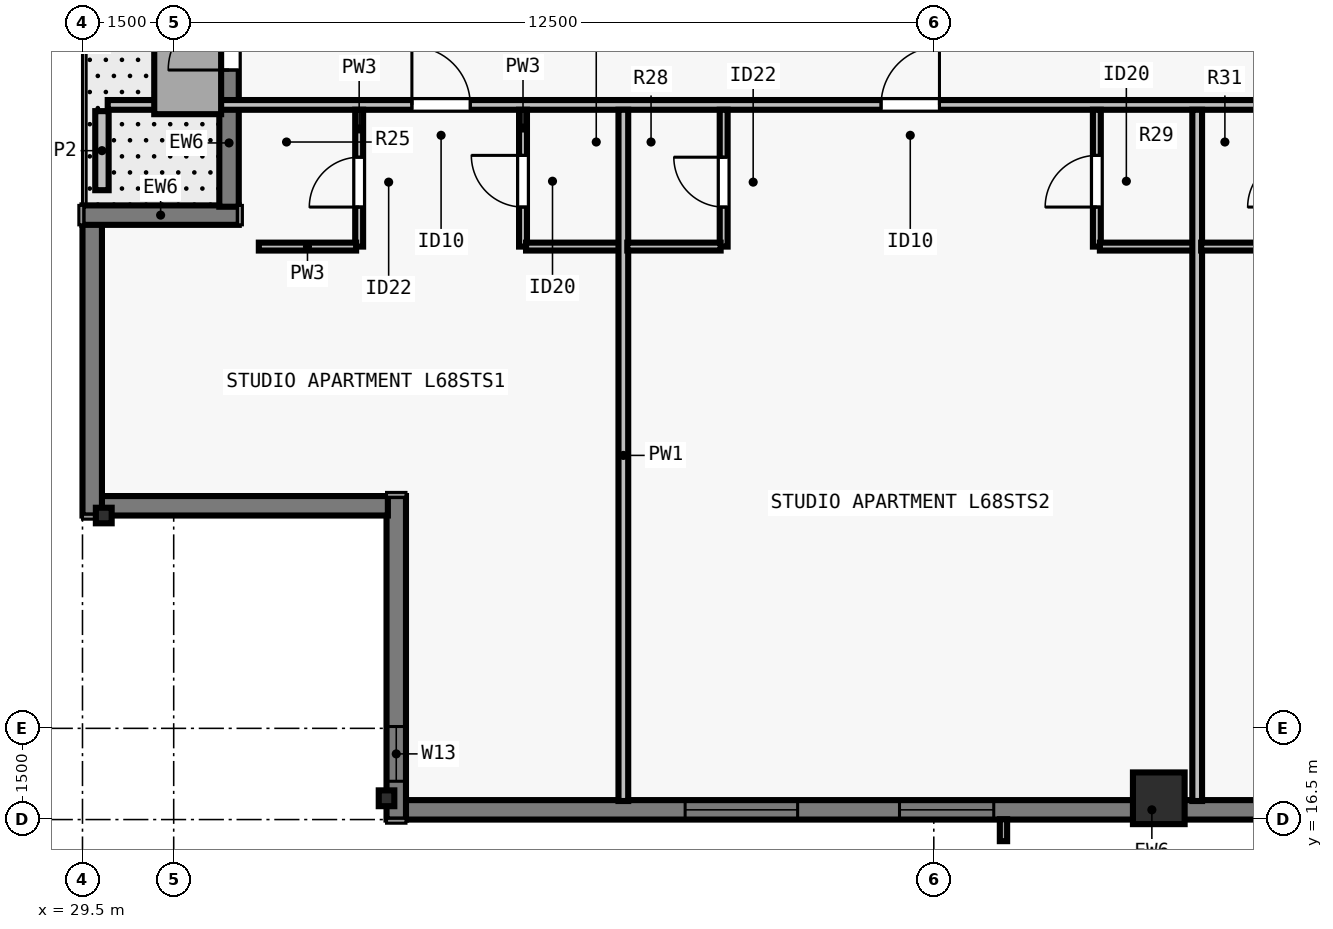
"""IFC4 building model, lengths in metres.
Left out: names, types, materials, properties, quantities, classifications, styles, units other than length and angle.
Written with IfcOpenShell. Run it as: python <this file> out.ifc"""

import sys

from ifc_helpers import new_model, si_unit, direction, frame, frame_2d, origin, origin_2d, place, context, subcontext, project, spatial, rectangle, i_section, extrude, element, fill, save


model = new_model("IFC4")
c1 = context("Model", 3, precision=1e-05, world=origin(), true_north=direction((0.0, 1.0)))
c2 = subcontext(c1, "Body", "Model", "MODEL_VIEW")
j1 = project(units=[si_unit("LENGTHUNIT", "METRE"), si_unit("PLANEANGLEUNIT", "RADIAN")], contexts=[c1])
p1 = place(None, origin())
s1 = spatial("IfcSite", under=j1, at=p1, CompositionType="ELEMENT")
p2 = place(p1, origin())
s2 = spatial("IfcBuilding", under=s1, at=p2, CompositionType="ELEMENT")
p3 = place(p2, frame((0.0, 0.0, 248.0)))
s3 = spatial("IfcBuildingStorey", under=s2, at=p3, CompositionType="ELEMENT", Elevation=248.0)
p4 = place(p3, frame((34.5, 16.85, 0.0), z_axis=(0.0, 0.0, 1.0), x_axis=(1.0, 0.0, 0.0)))
e1 = element("IfcColumn", 1, at=p4, inside=s3, PredefinedType="COLUMN", context=c2, shape_type="SweptSolid", body=[
    extrude(i_section(OverallWidth=0.256, OverallDepth=0.26, WebThickness=0.01, FlangeThickness=0.017, FilletRadius=0.013, at=origin_2d()), origin(), (0.0, 0.0, 1.0), 3.5),
])
p5 = place(p3, frame((47.2, 16.85, 0.0), z_axis=(0.0, 0.0, 1.0), x_axis=(1.0, 0.0, 0.0)))
e2 = element("IfcColumn", 2, at=p5, inside=s3, PredefinedType="COLUMN", context=c2, shape_type="SweptSolid", body=[
    extrude(rectangle(XDim=0.85, YDim=0.85, at=origin_2d()), origin(), (0.0, 0.0, 1.0), 3.5),
])
p6 = place(p3, frame((29.85, 21.5, 0.0), z_axis=(0.0, 0.0, 1.0), x_axis=(0.0, 1.0, 0.0)))
e3 = element("IfcColumn", 3, at=p6, inside=s3, PredefinedType="COLUMN", context=c2, shape_type="SweptSolid", body=[
    extrude(i_section(OverallWidth=0.256, OverallDepth=0.26, WebThickness=0.01, FlangeThickness=0.017, FilletRadius=0.013, at=origin_2d()), origin(), (0.0, 0.0, 1.0), 3.5),
])
p7 = place(p3, frame((69.5, 16.66, 0.0), z_axis=(0.0, 0.0, 1.0), x_axis=(-1.0, 0.0, 0.0)))
e4 = element("IfcWall", 4, at=p7, inside=s3, PredefinedType="SOLIDWALL", context=c2, shape_type="SweptSolid", body=[
    extrude(rectangle(XDim=34.702, YDim=0.32, at=frame_2d((17.351, 0.0))), origin(), (0.0, 0.0, 1.0), 3.29),
])
p8 = place(p7, frame((4.763, 0.0, 0.8)))
e5 = element("IfcOpeningElement", 5, at=p8, cuts=e4, PredefinedType="OPENING", context=c2, shape_type="SweptSolid", body=[
    extrude(rectangle(XDim=1.55, YDim=1.678, at=frame_2d((0.775, 0.839))), frame((0.0, 0.17, 0.0), z_axis=(0.0, -1.0, 0.0), x_axis=(1.0, 0.0, 0.0)), (0.0, 0.0, 1.0), 0.34),
])
p9 = place(p7, frame((7.988, 0.0, 0.8)))
e6 = element("IfcOpeningElement", 6, at=p9, cuts=e4, PredefinedType="OPENING", context=c2, shape_type="SweptSolid", body=[
    extrude(rectangle(XDim=1.85, YDim=1.678, at=frame_2d((0.925, 0.839))), frame((0.0, 0.17, 0.0), z_axis=(0.0, -1.0, 0.0), x_axis=(1.0, 0.0, 0.0)), (0.0, 0.0, 1.0), 0.34),
])
p10 = place(p7, frame((10.263, 0.0, 0.8)))
e7 = element("IfcOpeningElement", 7, at=p10, cuts=e4, PredefinedType="OPENING", context=c2, shape_type="SweptSolid", body=[
    extrude(rectangle(XDim=1.55, YDim=1.678, at=frame_2d((0.775, 0.839))), frame((0.0, 0.17, 0.0), z_axis=(0.0, -1.0, 0.0), x_axis=(1.0, 0.0, 0.0)), (0.0, 0.0, 1.0), 0.34),
])
p11 = place(p7, frame((14.738, 0.0, 0.8)))
e8 = element("IfcOpeningElement", 8, at=p11, cuts=e4, PredefinedType="OPENING", context=c2, shape_type="SweptSolid", body=[
    extrude(rectangle(XDim=1.85, YDim=1.678, at=frame_2d((0.925, 0.839))), frame((0.0, 0.17, 0.0), z_axis=(0.0, -1.0, 0.0), x_axis=(1.0, 0.0, 0.0)), (0.0, 0.0, 1.0), 0.34),
])
p12 = place(p7, frame((18.264, 0.0, 0.8)))
e9 = element("IfcOpeningElement", 9, at=p12, cuts=e4, PredefinedType="OPENING", context=c2, shape_type="SweptSolid", body=[
    extrude(rectangle(XDim=1.55, YDim=1.678, at=frame_2d((0.775, 0.839))), frame((0.0, 0.17, 0.0), z_axis=(0.0, -1.0, 0.0), x_axis=(1.0, 0.0, 0.0)), (0.0, 0.0, 1.0), 0.34),
])
p13 = place(p7, frame((25.014, 0.0, 0.8)))
e10 = element("IfcOpeningElement", 10, at=p13, cuts=e4, PredefinedType="OPENING", context=c2, shape_type="SweptSolid", body=[
    extrude(rectangle(XDim=1.55, YDim=1.678, at=frame_2d((0.775, 0.839))), frame((0.0, 0.17, 0.0), z_axis=(0.0, -1.0, 0.0), x_axis=(1.0, 0.0, 0.0)), (0.0, 0.0, 1.0), 0.34),
])
p14 = place(p7, frame((28.24, 0.0, 0.8)))
e11 = element("IfcOpeningElement", 11, at=p14, cuts=e4, PredefinedType="OPENING", context=c2, shape_type="SweptSolid", body=[
    extrude(rectangle(XDim=1.85, YDim=1.678, at=frame_2d((0.925, 0.839))), frame((0.0, 0.17, 0.0), z_axis=(0.0, -1.0, 0.0), x_axis=(1.0, 0.0, 0.0)), (0.0, 0.0, 1.0), 0.34),
])
p15 = place(p3, frame((34.66, 16.5, 0.0), z_axis=(0.0, 0.0, 1.0), x_axis=(0.0, 1.0, 0.0)))
e12 = element("IfcWall", 12, at=p15, inside=s3, PredefinedType="SOLIDWALL", context=c2, shape_type="SweptSolid", body=[
    extrude(rectangle(XDim=5.32, YDim=0.32, at=frame_2d((2.66, 0.0))), origin(), (0.0, 0.0, 1.0), 3.29),
])
p16 = place(p15, frame((0.63, 0.0, 0.8)))
e13 = element("IfcOpeningElement", 13, at=p16, cuts=e12, PredefinedType="OPENING", context=c2, shape_type="SweptSolid", body=[
    extrude(rectangle(XDim=0.9, YDim=1.678, at=frame_2d((0.45, 0.839))), frame((0.0, 0.17, 0.0), z_axis=(0.0, -1.0, 0.0), x_axis=(1.0, 0.0, 0.0)), (0.0, 0.0, 1.0), 0.34),
])
p17 = place(p3, frame((34.522, 21.66, 0.0), z_axis=(0.0, 0.0, 1.0), x_axis=(-1.0, 0.0, 0.0)))
e14 = element("IfcWall", 14, at=p17, inside=s3, PredefinedType="SOLIDWALL", context=c2, shape_type="SweptSolid", body=[
    extrude(rectangle(XDim=4.724, YDim=0.32, at=frame_2d((2.362, 0.0))), origin(), (0.0, 0.0, 1.0), 3.29),
])
p18 = place(p3, frame((29.66, 21.5, 0.0), z_axis=(0.0, 0.0, 1.0), x_axis=(0.0, 1.0, 0.0)))
e15 = element("IfcWall", 15, at=p18, inside=s3, PredefinedType="SOLIDWALL", context=c2, shape_type="SweptSolid", body=[
    extrude(rectangle(XDim=4.802, YDim=0.32, at=frame_2d((2.401, 0.0))), origin(), (0.0, 0.0, 1.0), 3.29),
])
p19 = place(p3, frame((29.5, 26.44, 0.0), z_axis=(0.0, 0.0, 1.0), x_axis=(1.0, 0.0, 0.0)))
e16 = element("IfcWall", 16, at=p19, inside=s3, PredefinedType="SOLIDWALL", context=c2, shape_type="SweptSolid", body=[
    extrude(rectangle(XDim=2.57, YDim=0.32, at=frame_2d((1.285, 0.0))), origin(), (0.0, 0.0, 1.0), 3.29),
])
p20 = place(p3, frame((31.91, 26.578, 0.0), z_axis=(0.0, 0.0, 1.0), x_axis=(0.0, 1.0, 0.0)))
e17 = element("IfcWall", 17, at=p20, inside=s3, PredefinedType="SOLIDWALL", context=c2, shape_type="SweptSolid", body=[
    extrude(rectangle(XDim=5.742, YDim=0.32, at=frame_2d((2.871, 0.0))), origin(), (0.0, 0.0, 1.0), 3.29),
])
p21 = place(p20, frame((2.248, 0.0, 0.0)))
e18 = element("IfcOpeningElement", 18, at=p21, cuts=e17, PredefinedType="OPENING", context=c2, shape_type="SweptSolid", body=[
    extrude(rectangle(XDim=1.0, YDim=2.15, at=frame_2d((0.5, 1.075))), frame((0.0, 0.17, 0.0), z_axis=(0.0, -1.0, 0.0), x_axis=(1.0, 0.0, 0.0)), (0.0, 0.0, 1.0), 0.34),
])
p22 = place(p20, frame((4.23, 0.0, 0.8)))
e19 = element("IfcOpeningElement", 19, at=p22, cuts=e17, PredefinedType="OPENING", context=c2, shape_type="SweptSolid", body=[
    extrude(rectangle(XDim=0.9, YDim=1.678, at=frame_2d((0.45, 0.839))), frame((0.0, 0.17, 0.0), z_axis=(0.0, -1.0, 0.0), x_axis=(1.0, 0.0, 0.0)), (0.0, 0.0, 1.0), 0.34),
])
p23 = place(p3, frame((29.82, 26.85, 0.0), z_axis=(0.0, 0.0, 1.0), x_axis=(0.0, 1.0, 0.0)))
e20 = element("IfcWall", 20, at=p23, inside=s3, PredefinedType="PARAPET", context=c2, shape_type="SweptSolid", body=[
    extrude(rectangle(XDim=1.3, YDim=0.22, at=frame_2d((0.65, 0.0))), origin(), (0.0, 0.0, 1.0), 0.55),
])
p24 = place(p3, frame((29.915, 28.252, 0.0), z_axis=(0.0, 0.0, 1.0), x_axis=(1.0, 0.0, 0.0)))
e21 = element("IfcWall", 21, at=p24, inside=s3, PredefinedType="PARTITIONING", context=c2, shape_type="SweptSolid", body=[
    extrude(rectangle(XDim=44.28, YDim=0.16, at=frame_2d((22.14, 0.0))), origin(), (0.0, 0.0, 1.0), 2.958),
])
p25 = place(p24, frame((5.002, 0.0, 0.0)))
e22 = element("IfcOpeningElement", 22, at=p25, cuts=e21, PredefinedType="OPENING", context=c2, shape_type="SweptSolid", body=[
    extrude(rectangle(XDim=0.96, YDim=2.18, at=frame_2d((0.48, 1.09))), frame((0.0, 0.09, 0.0), z_axis=(0.0, -1.0, 0.0), x_axis=(1.0, 0.0, 0.0)), (0.0, 0.0, 1.0), 0.18),
])
p26 = place(p24, frame((12.718, 0.0, 0.0)))
e23 = element("IfcOpeningElement", 23, at=p26, cuts=e21, PredefinedType="OPENING", context=c2, shape_type="SweptSolid", body=[
    extrude(rectangle(XDim=0.96, YDim=2.18, at=frame_2d((0.48, 1.09))), frame((0.0, 0.09, 0.0), z_axis=(0.0, -1.0, 0.0), x_axis=(1.0, 0.0, 0.0)), (0.0, 0.0, 1.0), 0.18),
])
p27 = place(p24, frame((21.55, 0.0, 0.0)))
e24 = element("IfcOpeningElement", 24, at=p27, cuts=e21, PredefinedType="OPENING", context=c2, shape_type="SweptSolid", body=[
    extrude(rectangle(XDim=0.96, YDim=2.18, at=frame_2d((0.48, 1.09))), frame((0.0, 0.09, 0.0), z_axis=(0.0, -1.0, 0.0), x_axis=(1.0, 0.0, 0.0)), (0.0, 0.0, 1.0), 0.18),
])
p28 = place(p24, frame((30.382, 0.0, 0.0)))
e25 = element("IfcOpeningElement", 25, at=p28, cuts=e21, PredefinedType="OPENING", context=c2, shape_type="SweptSolid", body=[
    extrude(rectangle(XDim=0.96, YDim=2.18, at=frame_2d((0.48, 1.09))), frame((0.0, 0.09, 0.0), z_axis=(0.0, -1.0, 0.0), x_axis=(1.0, 0.0, 0.0)), (0.0, 0.0, 1.0), 0.18),
])
p29 = place(p24, frame((39.393, 0.0, 0.0)))
e26 = element("IfcOpeningElement", 26, at=p29, cuts=e21, PredefinedType="OPENING", context=c2, shape_type="SweptSolid", body=[
    extrude(rectangle(XDim=0.96, YDim=2.18, at=frame_2d((0.48, 1.09))), frame((0.0, 0.09, 0.0), z_axis=(0.0, -1.0, 0.0), x_axis=(1.0, 0.0, 0.0)), (0.0, 0.0, 1.0), 0.18),
])
p30 = place(p3, frame((34.05, 25.923, 0.0), z_axis=(0.0, 0.0, 1.0), x_axis=(0.0, 1.0, 0.0)))
e27 = element("IfcWall", 27, at=p30, inside=s3, PredefinedType="PLUMBINGWALL", context=c2, shape_type="SweptSolid", body=[
    extrude(rectangle(XDim=2.25, YDim=0.13, at=frame_2d((1.125, 0.0))), origin(), (0.0, 0.0, 1.0), 3.29),
])
p31 = place(p30, frame((0.65, 0.0, 0.0)))
e28 = element("IfcOpeningElement", 28, at=p31, cuts=e27, PredefinedType="OPENING", context=c2, shape_type="SweptSolid", body=[
    extrude(rectangle(XDim=0.82, YDim=2.1, at=frame_2d((0.41, 1.05))), frame((0.0, 0.075, 0.0), z_axis=(0.0, -1.0, 0.0), x_axis=(1.0, 0.0, 0.0)), (0.0, 0.0, 1.0), 0.15),
])
p32 = place(p3, frame((32.4, 25.923, 0.0), z_axis=(0.0, 0.0, 1.0), x_axis=(1.0, 0.0, 0.0)))
e29 = element("IfcWall", 29, at=p32, inside=s3, PredefinedType="PLUMBINGWALL", context=c2, shape_type="SweptSolid", body=[
    extrude(rectangle(XDim=1.6, YDim=0.13, at=frame_2d((0.8, 0.0))), origin(), (0.0, 0.0, 1.0), 3.29),
])
p33 = place(p3, frame((36.744, 25.923, 0.0), z_axis=(0.0, 0.0, 1.0), x_axis=(0.0, 1.0, 0.0)))
e30 = element("IfcWall", 30, at=p33, inside=s3, PredefinedType="PLUMBINGWALL", context=c2, shape_type="SweptSolid", body=[
    extrude(rectangle(XDim=2.25, YDim=0.13, at=frame_2d((1.125, 0.0))), origin(), (0.0, 0.0, 1.0), 3.29),
])
p34 = place(p33, frame((0.65, 0.0, 0.0)))
e31 = element("IfcOpeningElement", 31, at=p34, cuts=e30, PredefinedType="OPENING", context=c2, shape_type="SweptSolid", body=[
    extrude(rectangle(XDim=0.85, YDim=2.1, at=frame_2d((0.425, 1.05))), frame((0.0, 0.075, 0.0), z_axis=(0.0, -1.0, 0.0), x_axis=(1.0, 0.0, 0.0)), (0.0, 0.0, 1.0), 0.15),
])
p35 = place(p3, frame((36.794, 25.923, 0.0), z_axis=(0.0, 0.0, 1.0), x_axis=(1.0, 0.0, 0.0)))
e32 = element("IfcWall", 32, at=p35, inside=s3, PredefinedType="PLUMBINGWALL", context=c2, shape_type="SweptSolid", body=[
    extrude(rectangle(XDim=1.6, YDim=0.13, at=frame_2d((0.8, 0.0))), origin(), (0.0, 0.0, 1.0), 3.29),
])
p36 = place(p3, frame((38.395, 16.805, 0.0), z_axis=(0.0, 0.0, 1.0), x_axis=(0.0, 1.0, 0.0)))
e33 = element("IfcWall", 33, at=p36, inside=s3, PredefinedType="PARTITIONING", context=c2, shape_type="SweptSolid", body=[
    extrude(rectangle(XDim=11.368, YDim=0.16, at=frame_2d((5.684, 0.0))), origin(), (0.0, 0.0, 1.0), 2.573),
])
p37 = place(p3, frame((40.044, 25.923, 0.0), z_axis=(0.0, 0.0, 1.0), x_axis=(0.0, 1.0, 0.0)))
e34 = element("IfcWall", 34, at=p37, inside=s3, PredefinedType="PLUMBINGWALL", context=c2, shape_type="SweptSolid", body=[
    extrude(rectangle(XDim=2.25, YDim=0.13, at=frame_2d((1.125, 0.0))), origin(), (0.0, 0.0, 1.0), 3.29),
])
p38 = place(p37, frame((0.65, 0.0, 0.0)))
e35 = element("IfcOpeningElement", 35, at=p38, cuts=e34, PredefinedType="OPENING", context=c2, shape_type="SweptSolid", body=[
    extrude(rectangle(XDim=0.82, YDim=2.1, at=frame_2d((0.41, 1.05))), frame((0.0, 0.075, 0.0), z_axis=(0.0, -1.0, 0.0), x_axis=(1.0, 0.0, 0.0)), (0.0, 0.0, 1.0), 0.15),
])
p39 = place(p3, frame((38.459, 25.923, 0.0), z_axis=(0.0, 0.0, 1.0), x_axis=(1.0, 0.0, 0.0)))
e36 = element("IfcWall", 36, at=p39, inside=s3, PredefinedType="PLUMBINGWALL", context=c2, shape_type="SweptSolid", body=[
    extrude(rectangle(XDim=1.535, YDim=0.13, at=frame_2d((0.768, 0.0))), origin(), (0.0, 0.0, 1.0), 3.29),
])
p40 = place(p3, frame((46.181, 25.923, 0.0), z_axis=(0.0, 0.0, 1.0), x_axis=(0.0, 1.0, 0.0)))
e37 = element("IfcWall", 37, at=p40, inside=s3, PredefinedType="PLUMBINGWALL", context=c2, shape_type="SweptSolid", body=[
    extrude(rectangle(XDim=2.25, YDim=0.13, at=frame_2d((1.125, 0.0))), origin(), (0.0, 0.0, 1.0), 3.29),
])
p41 = place(p40, frame((0.65, 0.0, 0.0)))
e38 = element("IfcOpeningElement", 38, at=p41, cuts=e37, PredefinedType="OPENING", context=c2, shape_type="SweptSolid", body=[
    extrude(rectangle(XDim=0.85, YDim=2.1, at=frame_2d((0.425, 1.05))), frame((0.0, 0.075, 0.0), z_axis=(0.0, -1.0, 0.0), x_axis=(1.0, 0.0, 0.0)), (0.0, 0.0, 1.0), 0.15),
])
p42 = place(p3, frame((46.231, 25.923, 0.0), z_axis=(0.0, 0.0, 1.0), x_axis=(1.0, 0.0, 0.0)))
e39 = element("IfcWall", 39, at=p42, inside=s3, PredefinedType="PLUMBINGWALL", context=c2, shape_type="SweptSolid", body=[
    extrude(rectangle(XDim=1.6, YDim=0.13, at=frame_2d((0.8, 0.0))), origin(), (0.0, 0.0, 1.0), 3.29),
])
p43 = place(p3, frame((47.832, 16.805, 0.0), z_axis=(0.0, 0.0, 1.0), x_axis=(0.0, 1.0, 0.0)))
e40 = element("IfcWall", 40, at=p43, inside=s3, PredefinedType="PARTITIONING", context=c2, shape_type="SweptSolid", body=[
    extrude(rectangle(XDim=11.368, YDim=0.16, at=frame_2d((5.684, 0.0))), origin(), (0.0, 0.0, 1.0), 2.958),
])
p44 = place(p3, frame((47.896, 25.923, 0.0), z_axis=(0.0, 0.0, 1.0), x_axis=(1.0, 0.0, 0.0)))
e41 = element("IfcWall", 41, at=p44, inside=s3, PredefinedType="PLUMBINGWALL", context=c2, shape_type="SweptSolid", body=[
    extrude(rectangle(XDim=1.535, YDim=0.13, at=frame_2d((0.768, 0.0))), origin(), (0.0, 0.0, 1.0), 3.29),
])
p45 = place(p13, origin())
e42 = element("IfcWindow", 42, at=p45, inside=s3, PartitioningType="SINGLE_PANEL", PredefinedType="WINDOW", context=c2, shape_type="SweptSolid", body=[
    extrude(rectangle(XDim=1.55, YDim=1.678, at=frame_2d((0.775, 0.839))), frame((0.0, -0.05, 0.0), z_axis=(0.0, -1.0, 0.0), x_axis=(1.0, 0.0, 0.0)), (0.0, 0.0, 1.0), 0.06),
])
fill(e10, e42)
p46 = place(p14, origin())
e43 = element("IfcWindow", 43, at=p46, inside=s3, PartitioningType="SINGLE_PANEL", PredefinedType="WINDOW", context=c2, shape_type="SweptSolid", body=[
    extrude(rectangle(XDim=1.85, YDim=1.678, at=frame_2d((0.925, 0.839))), frame((0.0, -0.05, 0.0), z_axis=(0.0, -1.0, 0.0), x_axis=(1.0, 0.0, 0.0)), (0.0, 0.0, 1.0), 0.06),
])
fill(e11, e43)
p47 = place(p21, origin())
e44 = element("IfcDoor", 44, at=p47, inside=s3, OperationType="SINGLE_SWING_LEFT", PredefinedType="DOOR", context=c2, shape_type="SweptSolid", body=[
    extrude(rectangle(XDim=1.0, YDim=2.15, at=frame_2d((0.5, 1.075))), frame((0.0, 0.025, 0.0), z_axis=(0.0, -1.0, 0.0), x_axis=(1.0, 0.0, 0.0)), (0.0, 0.0, 1.0), 0.05),
])
fill(e18, e44)
p48 = place(p16, origin())
e45 = element("IfcWindow", 45, at=p48, inside=s3, PartitioningType="SINGLE_PANEL", PredefinedType="WINDOW", context=c2, shape_type="SweptSolid", body=[
    extrude(rectangle(XDim=0.9, YDim=1.678, at=frame_2d((0.45, 0.839))), frame((0.0, -0.04, 0.0), z_axis=(0.0, -1.0, 0.0), x_axis=(1.0, 0.0, 0.0)), (0.0, 0.0, 1.0), 0.06),
])
fill(e13, e45)
p49 = place(p31, origin())
e46 = element("IfcDoor", 46, at=p49, inside=s3, OperationType="SINGLE_SWING_LEFT", PredefinedType="DOOR", context=c2, shape_type="SweptSolid", body=[
    extrude(rectangle(XDim=0.82, YDim=2.1, at=frame_2d((0.41, 1.05))), frame((0.0, 0.025, 0.0), z_axis=(0.0, -1.0, 0.0), x_axis=(1.0, 0.0, 0.0)), (0.0, 0.0, 1.0), 0.05),
])
fill(e28, e46)
p50 = place(p34, origin())
e47 = element("IfcDoor", 47, at=p50, inside=s3, OperationType="SINGLE_SWING_RIGHT", PredefinedType="DOOR", context=c2, shape_type="SweptSolid", body=[
    extrude(rectangle(XDim=0.85, YDim=2.1, at=frame_2d((0.425, 1.05))), frame((0.0, 0.025, 0.0), z_axis=(0.0, -1.0, 0.0), x_axis=(1.0, 0.0, 0.0)), (0.0, 0.0, 1.0), 0.05),
])
fill(e31, e47)
p51 = place(p25, origin())
e48 = element("IfcDoor", 48, at=p51, inside=s3, OperationType="SINGLE_SWING_LEFT", PredefinedType="DOOR", context=c2, shape_type="SweptSolid", body=[
    extrude(rectangle(XDim=0.96, YDim=2.18, at=frame_2d((0.48, 1.09))), frame((0.0, 0.025, 0.0), z_axis=(0.0, -1.0, 0.0), x_axis=(1.0, 0.0, 0.0)), (0.0, 0.0, 1.0), 0.05),
])
fill(e22, e48)
p52 = place(p38, origin())
e49 = element("IfcDoor", 49, at=p52, inside=s3, OperationType="SINGLE_SWING_RIGHT", PredefinedType="DOOR", context=c2, shape_type="SweptSolid", body=[
    extrude(rectangle(XDim=0.82, YDim=2.1, at=frame_2d((0.41, 1.05))), frame((0.0, 0.025, 0.0), z_axis=(0.0, -1.0, 0.0), x_axis=(1.0, 0.0, 0.0)), (0.0, 0.0, 1.0), 0.05),
])
fill(e35, e49)
p53 = place(p41, origin())
e50 = element("IfcDoor", 50, at=p53, inside=s3, OperationType="SINGLE_SWING_LEFT", PredefinedType="DOOR", context=c2, shape_type="SweptSolid", body=[
    extrude(rectangle(XDim=0.85, YDim=2.1, at=frame_2d((0.425, 1.05))), frame((0.0, 0.025, 0.0), z_axis=(0.0, -1.0, 0.0), x_axis=(1.0, 0.0, 0.0)), (0.0, 0.0, 1.0), 0.05),
])
fill(e38, e50)
p54 = place(p26, origin())
e51 = element("IfcDoor", 51, at=p54, inside=s3, OperationType="SINGLE_SWING_RIGHT", PredefinedType="DOOR", context=c2, shape_type="SweptSolid", body=[
    extrude(rectangle(XDim=0.96, YDim=2.18, at=frame_2d((0.48, 1.09))), frame((0.0, 0.025, 0.0), z_axis=(0.0, -1.0, 0.0), x_axis=(1.0, 0.0, 0.0)), (0.0, 0.0, 1.0), 0.05),
])
fill(e23, e51)
save(model, sys.argv[1])
